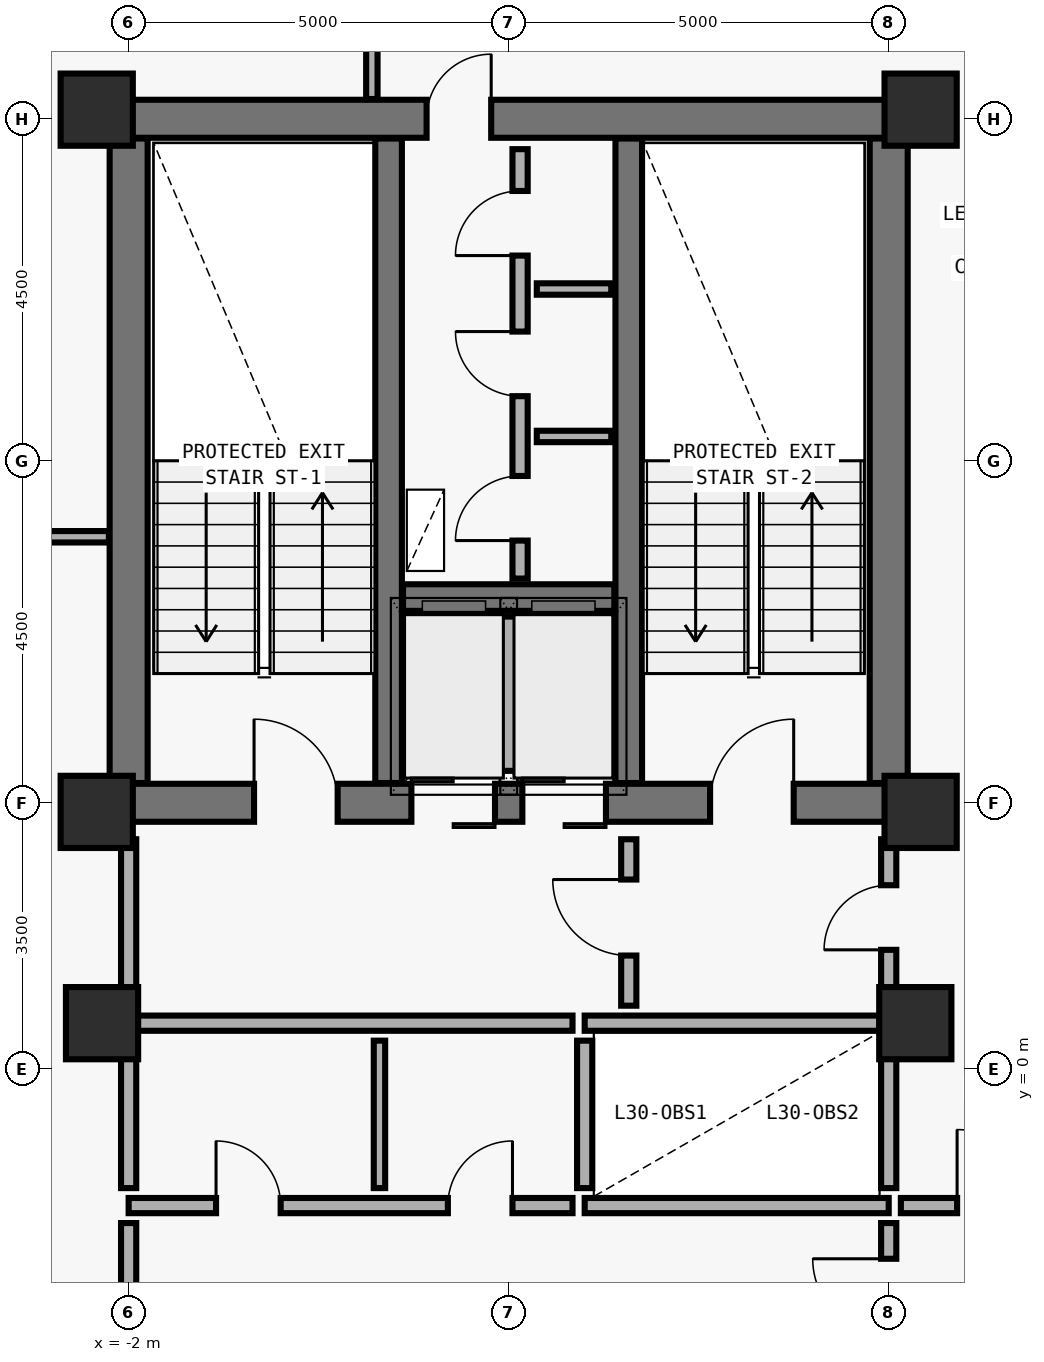
"""IFC4 building model, lengths in metres.
Left out: names, types, materials, properties, quantities, classifications, styles, units other than length and angle.
Written with IfcOpenShell. Run it as: python <this file> out.ifc"""

import sys

from ifc_helpers import new_model, si_unit, direction, frame, frame_2d, origin, origin_2d, place, context, subcontext, project, spatial, rectangle, extrude, element, fill, save


model = new_model("IFC4")
c1 = context("Model", 3, precision=1e-05, world=origin(), true_north=direction((0.0, 1.0)))
c2 = subcontext(c1, "Body", "Model", "MODEL_VIEW")
j1 = project(units=[si_unit("LENGTHUNIT", "METRE"), si_unit("PLANEANGLEUNIT", "RADIAN")], contexts=[c1])
p1 = place(None, origin())
s1 = spatial("IfcSite", under=j1, at=p1, CompositionType="ELEMENT")
p2 = place(p1, origin())
s2 = spatial("IfcBuilding", under=s1, at=p2, CompositionType="ELEMENT")
p3 = place(p2, frame((0.0, 0.0, 122.7)))
s3 = spatial("IfcBuildingStorey", under=s2, at=p3, CompositionType="ELEMENT", Elevation=122.7)
p4 = place(p3, frame((-2.0, 3.5, 0.0), z_axis=(0.0, 0.0, 1.0), x_axis=(1.0, 0.0, 0.0)))
e1 = element("IfcWall", 1, at=p4, inside=s3, PredefinedType="SHEAR", context=c2, shape_type="SweptSolid", body=[
    extrude(rectangle(XDim=10.0, YDim=0.5, at=frame_2d((5.0, 0.0))), origin(), (0.0, 0.0, 1.0), 3.892),
])
p5 = place(p4, frame((1.65, 0.0, 0.0)))
e2 = element("IfcOpeningElement", 2, at=p5, cuts=e1, PredefinedType="OPENING", context=c2, shape_type="SweptSolid", body=[
    extrude(rectangle(XDim=1.1, YDim=2.15, at=frame_2d((0.55, 1.075))), frame((0.0, 0.26, 0.0), z_axis=(0.0, -1.0, 0.0), x_axis=(1.0, 0.0, 0.0)), (0.0, 0.0, 1.0), 0.52),
])
p6 = place(p4, frame((7.65, 0.0, 0.0)))
e3 = element("IfcOpeningElement", 3, at=p6, cuts=e1, PredefinedType="OPENING", context=c2, shape_type="SweptSolid", body=[
    extrude(rectangle(XDim=1.1, YDim=2.15, at=frame_2d((0.55, 1.075))), frame((0.0, 0.26, 0.0), z_axis=(0.0, -1.0, 0.0), x_axis=(1.0, 0.0, 0.0)), (0.0, 0.0, 1.0), 0.52),
])
p7 = place(p4, frame((3.72, 0.0, 0.0)))
e4 = element("IfcOpeningElement", 4, at=p7, cuts=e1, PredefinedType="OPENING", context=c2, shape_type="SweptSolid", body=[
    extrude(rectangle(XDim=1.1, YDim=2.2, at=frame_2d((0.55, 1.1))), frame((0.0, 0.26, 0.0), z_axis=(0.0, -1.0, 0.0), x_axis=(1.0, 0.0, 0.0)), (0.0, 0.0, 1.0), 0.52),
])
p8 = place(p4, frame((5.18, 0.0, 0.0)))
e5 = element("IfcOpeningElement", 5, at=p8, cuts=e1, PredefinedType="OPENING", context=c2, shape_type="SweptSolid", body=[
    extrude(rectangle(XDim=1.1, YDim=2.2, at=frame_2d((0.55, 1.1))), frame((0.0, 0.26, 0.0), z_axis=(0.0, -1.0, 0.0), x_axis=(1.0, 0.0, 0.0)), (0.0, 0.0, 1.0), 0.52),
])
p9 = place(p3, frame((-2.0, 12.5, 0.0), z_axis=(0.0, 0.0, 1.0), x_axis=(1.0, 0.0, 0.0)))
e6 = element("IfcWall", 6, at=p9, inside=s3, PredefinedType="SHEAR", context=c2, shape_type="SweptSolid", body=[
    extrude(rectangle(XDim=10.0, YDim=0.5, at=frame_2d((5.0, 0.0))), origin(), (0.0, 0.0, 1.0), 3.892),
])
p10 = place(p9, frame((3.92, 0.0, 0.0)))
e7 = element("IfcOpeningElement", 7, at=p10, cuts=e6, PredefinedType="OPENING", context=c2, shape_type="SweptSolid", body=[
    extrude(rectangle(XDim=0.85, YDim=2.1, at=frame_2d((0.425, 1.05))), frame((0.0, 0.26, 0.0), z_axis=(0.0, -1.0, 0.0), x_axis=(1.0, 0.0, 0.0)), (0.0, 0.0, 1.0), 0.52),
])
for number, where, z_axis, x_axis in (
    (8, (-2.0, 3.76, 0.0), (0.0, 0.0, 1.0), (0.0, 1.0, 0.0)),
    (9, (8.0, 3.76, 0.0), (0.0, 0.0, 1.0), (0.0, 1.0, 0.0)),
):
    element("IfcWall", number, at=place(p3, frame(where, z_axis=z_axis, x_axis=x_axis)), inside=s3, PredefinedType="SHEAR", context=c2, shape_type="SweptSolid", body=[
        extrude(rectangle(XDim=8.48, YDim=0.5, at=frame_2d((4.24, 0.0))), origin(), (0.0, 0.0, 1.0), 3.892),
    ])
for number, where, z_axis, x_axis in (
    (10, (1.42, 3.76, 0.0), (0.0, 0.0, 1.0), (0.0, 1.0, 0.0)),
    (11, (4.58, 3.76, 0.0), (0.0, 0.0, 1.0), (0.0, 1.0, 0.0)),
):
    element("IfcWall", number, at=place(p3, frame(where, z_axis=z_axis, x_axis=x_axis)), inside=s3, PredefinedType="SHEAR", context=c2, shape_type="SweptSolid", body=[
        extrude(rectangle(XDim=8.48, YDim=0.35, at=frame_2d((4.24, 0.0))), origin(), (0.0, 0.0, 1.0), 3.892),
    ])
p11 = place(p3, frame((1.61, 6.2, 0.0), z_axis=(0.0, 0.0, 1.0), x_axis=(1.0, 0.0, 0.0)))
e12 = element("IfcWall", 12, at=p11, inside=s3, PredefinedType="SHEAR", context=c2, shape_type="SweptSolid", body=[
    extrude(rectangle(XDim=2.78, YDim=0.35, at=frame_2d((1.39, 0.0))), origin(), (0.0, 0.0, 1.0), 3.892),
])
for number, where, z_axis, x_axis in (
    (13, (-2.42, 12.62, 0.0), (0.0, 0.0, 1.0), (1.0, 0.0, 0.0)),
    (14, (8.42, 12.62, 0.0), (0.0, 0.0, 1.0), (1.0, 0.0, 0.0)),
    (15, (-2.42, 3.38, 0.0), (0.0, 0.0, 1.0), (1.0, 0.0, 0.0)),
    (16, (8.42, 3.38, 0.0), (0.0, 0.0, 1.0), (1.0, 0.0, 0.0)),
    (17, (-2.35, 0.6, 0.0), (0.0, 0.0, 1.0), (1.0, 0.0, 0.0)),
    (18, (8.35, 0.6, 0.0), (0.0, 0.0, 1.0), (1.0, 0.0, 0.0)),
):
    element("IfcColumn", number, at=place(p3, frame(where, z_axis=z_axis, x_axis=x_axis)), inside=s3, PredefinedType="COLUMN", context=c2, shape_type="SweptSolid", body=[
        extrude(rectangle(XDim=0.95, YDim=0.95, at=origin_2d()), origin(), (0.0, 0.0, 1.0), 3.875),
    ])
p12 = place(p3, frame((3.0, 3.92, 0.0), z_axis=(0.0, 0.0, 1.0), x_axis=(0.0, 1.0, 0.0)))
e19 = element("IfcWall", 19, at=p12, inside=s3, PredefinedType="SOLIDWALL", context=c2, shape_type="SweptSolid", body=[
    extrude(rectangle(XDim=2.03, YDim=0.2, at=frame_2d((1.015, 0.0))), origin(), (0.0, 0.0, 1.0), 3.64),
])
p13 = place(p3, frame((4.0, 0.6, 0.0), z_axis=(0.0, 0.0, 1.0), x_axis=(1.0, 0.0, 0.0)))
e20 = element("IfcWall", 20, at=p13, inside=s3, PredefinedType="SOLIDWALL", context=c2, shape_type="SweptSolid", body=[
    extrude(rectangle(XDim=3.88, YDim=0.2, at=frame_2d((1.94, 0.0))), origin(), (0.0, 0.0, 1.0), 3.222),
])
p14 = place(p3, frame((4.0, -1.8, 0.0), z_axis=(0.0, 0.0, 1.0), x_axis=(1.0, 0.0, 0.0)))
e21 = element("IfcWall", 21, at=p14, inside=s3, PredefinedType="SOLIDWALL", context=c2, shape_type="SweptSolid", body=[
    extrude(rectangle(XDim=4.0, YDim=0.2, at=frame_2d((2.0, 0.0))), origin(), (0.0, 0.0, 1.0), 3.64),
])
p15 = place(p3, frame((4.0, -1.57, 0.0), z_axis=(0.0, 0.0, 1.0), x_axis=(0.0, 1.0, 0.0)))
e22 = element("IfcWall", 22, at=p15, inside=s3, PredefinedType="SOLIDWALL", context=c2, shape_type="SweptSolid", body=[
    extrude(rectangle(XDim=1.94, YDim=0.2, at=frame_2d((0.97, 0.0))), origin(), (0.0, 0.0, 1.0), 3.64),
])
p16 = place(p3, frame((8.0, -1.57, 0.0), z_axis=(0.0, 0.0, 1.0), x_axis=(0.0, 1.0, 0.0)))
e23 = element("IfcWall", 23, at=p16, inside=s3, PredefinedType="SOLIDWALL", context=c2, shape_type="SweptSolid", body=[
    extrude(rectangle(XDim=2.05, YDim=0.2, at=frame_2d((1.025, 0.0))), origin(), (0.0, 0.0, 1.0), 3.072),
])
p17 = place(p3, frame((3.15, 6.45, 0.0), z_axis=(0.0, 0.0, 1.0), x_axis=(0.0, 1.0, 0.0)))
e24 = element("IfcWall", 24, at=p17, inside=s3, PredefinedType="MOVABLE", context=c2, shape_type="SweptSolid", body=[
    extrude(rectangle(XDim=5.65, YDim=0.2, at=frame_2d((2.825, 0.0))), origin(), (0.0, 0.0, 1.0), 3.64),
])
p18 = place(p17, frame((0.5, 0.0, 0.0)))
e25 = element("IfcOpeningElement", 25, at=p18, cuts=e24, PredefinedType="OPENING", context=c2, shape_type="SweptSolid", body=[
    extrude(rectangle(XDim=0.85, YDim=2.1, at=frame_2d((0.425, 1.05))), frame((0.0, 0.11, 0.0), z_axis=(0.0, -1.0, 0.0), x_axis=(1.0, 0.0, 0.0)), (0.0, 0.0, 1.0), 0.22),
])
p19 = place(p17, frame((2.4, 0.0, 0.0)))
e26 = element("IfcOpeningElement", 26, at=p19, cuts=e24, PredefinedType="OPENING", context=c2, shape_type="SweptSolid", body=[
    extrude(rectangle(XDim=0.85, YDim=2.1, at=frame_2d((0.425, 1.05))), frame((0.0, 0.11, 0.0), z_axis=(0.0, -1.0, 0.0), x_axis=(1.0, 0.0, 0.0)), (0.0, 0.0, 1.0), 0.22),
])
p20 = place(p17, frame((4.25, 0.0, 0.0)))
e27 = element("IfcOpeningElement", 27, at=p20, cuts=e24, PredefinedType="OPENING", context=c2, shape_type="SweptSolid", body=[
    extrude(rectangle(XDim=0.85, YDim=2.1, at=frame_2d((0.425, 1.05))), frame((0.0, 0.11, 0.0), z_axis=(0.0, -1.0, 0.0), x_axis=(1.0, 0.0, 0.0)), (0.0, 0.0, 1.0), 0.22),
])
p21 = place(p3, frame((4.58, 0.83, 0.0), z_axis=(0.0, 0.0, 1.0), x_axis=(0.0, 1.0, 0.0)))
e28 = element("IfcWall", 28, at=p21, inside=s3, PredefinedType="MOVABLE", context=c2, shape_type="SweptSolid", body=[
    extrude(rectangle(XDim=2.19, YDim=0.2, at=frame_2d((1.095, 0.0))), origin(), (0.0, 0.0, 1.0), 3.64),
])
p22 = place(p21, frame((0.66, 0.0, 0.0)))
e29 = element("IfcOpeningElement", 29, at=p22, cuts=e28, PredefinedType="OPENING", context=c2, shape_type="SweptSolid", body=[
    extrude(rectangle(XDim=1.0, YDim=2.1, at=frame_2d((0.5, 1.05))), frame((0.0, 0.11, 0.0), z_axis=(0.0, -1.0, 0.0), x_axis=(1.0, 0.0, 0.0)), (0.0, 0.0, 1.0), 0.22),
])
p23 = place(p3, frame((8.0, 0.72, 0.0), z_axis=(0.0, 0.0, 1.0), x_axis=(0.0, 1.0, 0.0)))
e30 = element("IfcWall", 30, at=p23, inside=s3, PredefinedType="MOVABLE", context=c2, shape_type="SweptSolid", body=[
    extrude(rectangle(XDim=2.3, YDim=0.2, at=frame_2d((1.15, 0.0))), origin(), (0.0, 0.0, 1.0), 2.872),
])
p24 = place(p23, frame((0.845, 0.0, 0.0)))
e31 = element("IfcOpeningElement", 31, at=p24, cuts=e30, PredefinedType="OPENING", context=c2, shape_type="SweptSolid", body=[
    extrude(rectangle(XDim=0.85, YDim=2.1, at=frame_2d((0.425, 1.05))), frame((0.0, 0.11, 0.0), z_axis=(0.0, -1.0, 0.0), x_axis=(1.0, 0.0, 0.0)), (0.0, 0.0, 1.0), 0.22),
])
p25 = place(p3, frame((8.0, -3.97, 0.0), z_axis=(0.0, 0.0, 1.0), x_axis=(0.0, 1.0, 0.0)))
e32 = element("IfcWall", 32, at=p25, inside=s3, PredefinedType="MOVABLE", context=c2, shape_type="SweptSolid", body=[
    extrude(rectangle(XDim=1.94, YDim=0.2, at=frame_2d((0.97, 0.0))), origin(), (0.0, 0.0, 1.0), 3.072),
])
p26 = place(p25, frame((0.47, 0.0, 0.0)))
e33 = element("IfcOpeningElement", 33, at=p26, cuts=e32, PredefinedType="OPENING", context=c2, shape_type="SweptSolid", body=[
    extrude(rectangle(XDim=1.0, YDim=2.1, at=frame_2d((0.5, 1.05))), frame((0.0, 0.11, 0.0), z_axis=(0.0, -1.0, 0.0), x_axis=(1.0, 0.0, 0.0)), (0.0, 0.0, 1.0), 0.22),
])
p27 = place(p3, frame((-2.0, -1.8, 0.0), z_axis=(0.0, 0.0, 1.0), x_axis=(1.0, 0.0, 0.0)))
e34 = element("IfcWall", 34, at=p27, inside=s3, PredefinedType="MOVABLE", context=c2, shape_type="SweptSolid", body=[
    extrude(rectangle(XDim=5.84, YDim=0.2, at=frame_2d((2.92, 0.0))), origin(), (0.0, 0.0, 1.0), 3.64),
])
p28 = place(p27, frame((1.15, 0.0, 0.0)))
e35 = element("IfcOpeningElement", 35, at=p28, cuts=e34, PredefinedType="OPENING", context=c2, shape_type="SweptSolid", body=[
    extrude(rectangle(XDim=0.85, YDim=2.1, at=frame_2d((0.425, 1.05))), frame((0.0, 0.11, 0.0), z_axis=(0.0, -1.0, 0.0), x_axis=(1.0, 0.0, 0.0)), (0.0, 0.0, 1.0), 0.22),
])
p29 = place(p27, frame((4.2, 0.0, 0.0)))
e36 = element("IfcOpeningElement", 36, at=p29, cuts=e34, PredefinedType="OPENING", context=c2, shape_type="SweptSolid", body=[
    extrude(rectangle(XDim=0.85, YDim=2.1, at=frame_2d((0.425, 1.05))), frame((0.0, 0.11, 0.0), z_axis=(0.0, -1.0, 0.0), x_axis=(1.0, 0.0, 0.0)), (0.0, 0.0, 1.0), 0.22),
])
p30 = place(p3, frame((8.16, -1.8, 0.0), z_axis=(0.0, 0.0, 1.0), x_axis=(1.0, 0.0, 0.0)))
e37 = element("IfcWall", 37, at=p30, inside=s3, PredefinedType="MOVABLE", context=c2, shape_type="SweptSolid", body=[
    extrude(rectangle(XDim=2.64, YDim=0.2, at=frame_2d((1.32, 0.0))), origin(), (0.0, 0.0, 1.0), 3.64),
])
p31 = place(p30, frame((0.74, 0.0, 0.0)))
e38 = element("IfcOpeningElement", 38, at=p31, cuts=e37, PredefinedType="OPENING", context=c2, shape_type="SweptSolid", body=[
    extrude(rectangle(XDim=1.0, YDim=2.1, at=frame_2d((0.5, 1.05))), frame((0.0, 0.11, 0.0), z_axis=(0.0, -1.0, 0.0), x_axis=(1.0, 0.0, 0.0)), (0.0, 0.0, 1.0), 0.22),
])
for number, where, z_axis, x_axis in (
    (39, (3.37, 8.32, 0.0), (0.0, 0.0, 1.0), (1.0, 0.0, 0.0)),
    (40, (3.37, 10.26, 0.0), (0.0, 0.0, 1.0), (1.0, 0.0, 0.0)),
):
    element("IfcWall", number, at=place(p3, frame(where, z_axis=z_axis, x_axis=x_axis)), inside=s3, PredefinedType="PARTITIONING", context=c2, shape_type="SweptSolid", body=[
        extrude(rectangle(XDim=0.98, YDim=0.15, at=frame_2d((0.49, 0.0))), origin(), (0.0, 0.0, 1.0), 3.64),
    ])
p32 = place(p3, frame((-1.88, 0.6, 0.0), z_axis=(0.0, 0.0, 1.0), x_axis=(1.0, 0.0, 0.0)))
e41 = element("IfcWall", 41, at=p32, inside=s3, PredefinedType="MOVABLE", context=c2, shape_type="SweptSolid", body=[
    extrude(rectangle(XDim=5.72, YDim=0.2, at=frame_2d((2.86, 0.0))), origin(), (0.0, 0.0, 1.0), 3.222),
])
p33 = place(p3, frame((-2.0, 0.72, 0.0), z_axis=(0.0, 0.0, 1.0), x_axis=(0.0, 1.0, 0.0)))
e42 = element("IfcWall", 42, at=p33, inside=s3, PredefinedType="MOVABLE", context=c2, shape_type="SweptSolid", body=[
    extrude(rectangle(XDim=2.3, YDim=0.2, at=frame_2d((1.15, 0.0))), origin(), (0.0, 0.0, 1.0), 2.872),
])
p34 = place(p3, frame((-2.0, -3.97, 0.0), z_axis=(0.0, 0.0, 1.0), x_axis=(0.0, 1.0, 0.0)))
e43 = element("IfcWall", 43, at=p34, inside=s3, PredefinedType="MOVABLE", context=c2, shape_type="SweptSolid", body=[
    extrude(rectangle(XDim=1.94, YDim=0.2, at=frame_2d((0.97, 0.0))), origin(), (0.0, 0.0, 1.0), 3.022),
])
p35 = place(p3, frame((1.3, -1.57, 0.0), z_axis=(0.0, 0.0, 1.0), x_axis=(0.0, 1.0, 0.0)))
e44 = element("IfcWall", 44, at=p35, inside=s3, PredefinedType="PARTITIONING", context=c2, shape_type="SweptSolid", body=[
    extrude(rectangle(XDim=1.94, YDim=0.15, at=frame_2d((0.97, 0.0))), origin(), (0.0, 0.0, 1.0), 3.64),
])
p36 = place(p3, frame((-2.0, -1.57, 0.0), z_axis=(0.0, 0.0, 1.0), x_axis=(0.0, 1.0, 0.0)))
e45 = element("IfcWall", 45, at=p36, inside=s3, PredefinedType="MOVABLE", context=c2, shape_type="SweptSolid", body=[
    extrude(rectangle(XDim=2.05, YDim=0.2, at=frame_2d((1.025, 0.0))), origin(), (0.0, 0.0, 1.0), 3.022),
])
p37 = place(p3, frame((-4.465, 7.0, 0.0), z_axis=(0.0, 0.0, 1.0), x_axis=(1.0, 0.0, 0.0)))
e46 = element("IfcWall", 46, at=p37, inside=s3, PredefinedType="PARTITIONING", context=c2, shape_type="SweptSolid", body=[
    extrude(rectangle(XDim=2.205, YDim=0.15, at=frame_2d((1.103, 0.0))), origin(), (0.0, 0.0, 1.0), 3.64),
])
p38 = place(p3, frame((1.2, 14.615, 0.0), z_axis=(0.0, 0.0, 1.0), x_axis=(0.0, -1.0, 0.0)))
e47 = element("IfcWall", 47, at=p38, inside=s3, PredefinedType="PARTITIONING", context=c2, shape_type="SweptSolid", body=[
    extrude(rectangle(XDim=1.855, YDim=0.15, at=frame_2d((0.927, 0.0))), origin(), (0.0, 0.0, 1.0), 3.64),
])
p39 = place(p5, origin())
e48 = element("IfcDoor", 48, at=p39, inside=s3, OperationType="SINGLE_SWING_LEFT", PredefinedType="DOOR", context=c2, shape_type="SweptSolid", body=[
    extrude(rectangle(XDim=1.1, YDim=2.15, at=frame_2d((0.55, 1.075))), frame((0.0, 0.025, 0.0), z_axis=(0.0, -1.0, 0.0), x_axis=(1.0, 0.0, 0.0)), (0.0, 0.0, 1.0), 0.05),
])
fill(e2, e48)
p40 = place(p6, origin())
e49 = element("IfcDoor", 49, at=p40, inside=s3, OperationType="SINGLE_SWING_RIGHT", PredefinedType="DOOR", context=c2, shape_type="SweptSolid", body=[
    extrude(rectangle(XDim=1.1, YDim=2.15, at=frame_2d((0.55, 1.075))), frame((0.0, 0.025, 0.0), z_axis=(0.0, -1.0, 0.0), x_axis=(1.0, 0.0, 0.0)), (0.0, 0.0, 1.0), 0.05),
])
fill(e3, e49)
p41 = place(p7, origin())
e50 = element("IfcDoor", 50, at=p41, inside=s3, OperationType="DOUBLE_DOOR_SLIDING", PredefinedType="DOOR", context=c2, shape_type="SweptSolid", body=[
    extrude(rectangle(XDim=1.1, YDim=2.2, at=frame_2d((0.55, 1.1))), frame((0.0, 0.025, 0.0), z_axis=(0.0, -1.0, 0.0), x_axis=(1.0, 0.0, 0.0)), (0.0, 0.0, 1.0), 0.05),
])
fill(e4, e50)
p42 = place(p8, origin())
e51 = element("IfcDoor", 51, at=p42, inside=s3, OperationType="DOUBLE_DOOR_SLIDING", PredefinedType="DOOR", context=c2, shape_type="SweptSolid", body=[
    extrude(rectangle(XDim=1.1, YDim=2.2, at=frame_2d((0.55, 1.1))), frame((0.0, 0.025, 0.0), z_axis=(0.0, -1.0, 0.0), x_axis=(1.0, 0.0, 0.0)), (0.0, 0.0, 1.0), 0.05),
])
fill(e5, e51)
p43 = place(p10, origin())
e52 = element("IfcDoor", 52, at=p43, inside=s3, OperationType="SINGLE_SWING_RIGHT", PredefinedType="DOOR", context=c2, shape_type="SweptSolid", body=[
    extrude(rectangle(XDim=0.85, YDim=2.1, at=frame_2d((0.425, 1.05))), frame((0.0, 0.025, 0.0), z_axis=(0.0, -1.0, 0.0), x_axis=(1.0, 0.0, 0.0)), (0.0, 0.0, 1.0), 0.05),
])
fill(e7, e52)
p44 = place(p18, origin())
e53 = element("IfcDoor", 53, at=p44, inside=s3, OperationType="SINGLE_SWING_LEFT", PredefinedType="DOOR", context=c2, shape_type="SweptSolid", body=[
    extrude(rectangle(XDim=0.85, YDim=2.1, at=frame_2d((0.425, 1.05))), frame((0.0, 0.025, 0.0), z_axis=(0.0, -1.0, 0.0), x_axis=(1.0, 0.0, 0.0)), (0.0, 0.0, 1.0), 0.05),
])
fill(e25, e53)
p45 = place(p19, origin())
e54 = element("IfcDoor", 54, at=p45, inside=s3, OperationType="SINGLE_SWING_RIGHT", PredefinedType="DOOR", context=c2, shape_type="SweptSolid", body=[
    extrude(rectangle(XDim=0.85, YDim=2.1, at=frame_2d((0.425, 1.05))), frame((0.0, 0.025, 0.0), z_axis=(0.0, -1.0, 0.0), x_axis=(1.0, 0.0, 0.0)), (0.0, 0.0, 1.0), 0.05),
])
fill(e26, e54)
p46 = place(p20, origin())
e55 = element("IfcDoor", 55, at=p46, inside=s3, OperationType="SINGLE_SWING_LEFT", PredefinedType="DOOR", context=c2, shape_type="SweptSolid", body=[
    extrude(rectangle(XDim=0.85, YDim=2.1, at=frame_2d((0.425, 1.05))), frame((0.0, 0.025, 0.0), z_axis=(0.0, -1.0, 0.0), x_axis=(1.0, 0.0, 0.0)), (0.0, 0.0, 1.0), 0.05),
])
fill(e27, e55)
p47 = place(p22, origin())
e56 = element("IfcDoor", 56, at=p47, inside=s3, OperationType="SINGLE_SWING_RIGHT", PredefinedType="DOOR", context=c2, shape_type="SweptSolid", body=[
    extrude(rectangle(XDim=1.0, YDim=2.1, at=frame_2d((0.5, 1.05))), frame((0.0, 0.025, 0.0), z_axis=(0.0, -1.0, 0.0), x_axis=(1.0, 0.0, 0.0)), (0.0, 0.0, 1.0), 0.05),
])
fill(e29, e56)
p48 = place(p24, origin())
e57 = element("IfcDoor", 57, at=p48, inside=s3, OperationType="SINGLE_SWING_LEFT", PredefinedType="DOOR", context=c2, shape_type="SweptSolid", body=[
    extrude(rectangle(XDim=0.85, YDim=2.1, at=frame_2d((0.425, 1.05))), frame((0.0, 0.025, 0.0), z_axis=(0.0, -1.0, 0.0), x_axis=(1.0, 0.0, 0.0)), (0.0, 0.0, 1.0), 0.05),
])
fill(e31, e57)
p49 = place(p26, origin())
e58 = element("IfcDoor", 58, at=p49, inside=s3, OperationType="SINGLE_SWING_RIGHT", PredefinedType="DOOR", context=c2, shape_type="SweptSolid", body=[
    extrude(rectangle(XDim=1.0, YDim=2.1, at=frame_2d((0.5, 1.05))), frame((0.0, 0.025, 0.0), z_axis=(0.0, -1.0, 0.0), x_axis=(1.0, 0.0, 0.0)), (0.0, 0.0, 1.0), 0.05),
])
fill(e33, e58)
p50 = place(p28, origin())
e59 = element("IfcDoor", 59, at=p50, inside=s3, OperationType="SINGLE_SWING_LEFT", PredefinedType="DOOR", context=c2, shape_type="SweptSolid", body=[
    extrude(rectangle(XDim=0.85, YDim=2.1, at=frame_2d((0.425, 1.05))), frame((0.0, 0.025, 0.0), z_axis=(0.0, -1.0, 0.0), x_axis=(1.0, 0.0, 0.0)), (0.0, 0.0, 1.0), 0.05),
])
fill(e35, e59)
p51 = place(p29, origin())
e60 = element("IfcDoor", 60, at=p51, inside=s3, OperationType="SINGLE_SWING_RIGHT", PredefinedType="DOOR", context=c2, shape_type="SweptSolid", body=[
    extrude(rectangle(XDim=0.85, YDim=2.1, at=frame_2d((0.425, 1.05))), frame((0.0, 0.025, 0.0), z_axis=(0.0, -1.0, 0.0), x_axis=(1.0, 0.0, 0.0)), (0.0, 0.0, 1.0), 0.05),
])
fill(e36, e60)
p52 = place(p31, origin())
e61 = element("IfcDoor", 61, at=p52, inside=s3, OperationType="SINGLE_SWING_LEFT", PredefinedType="DOOR", context=c2, shape_type="SweptSolid", body=[
    extrude(rectangle(XDim=1.0, YDim=2.1, at=frame_2d((0.5, 1.05))), frame((0.0, 0.025, 0.0), z_axis=(0.0, -1.0, 0.0), x_axis=(1.0, 0.0, 0.0)), (0.0, 0.0, 1.0), 0.05),
])
fill(e38, e61)
save(model, sys.argv[1])
